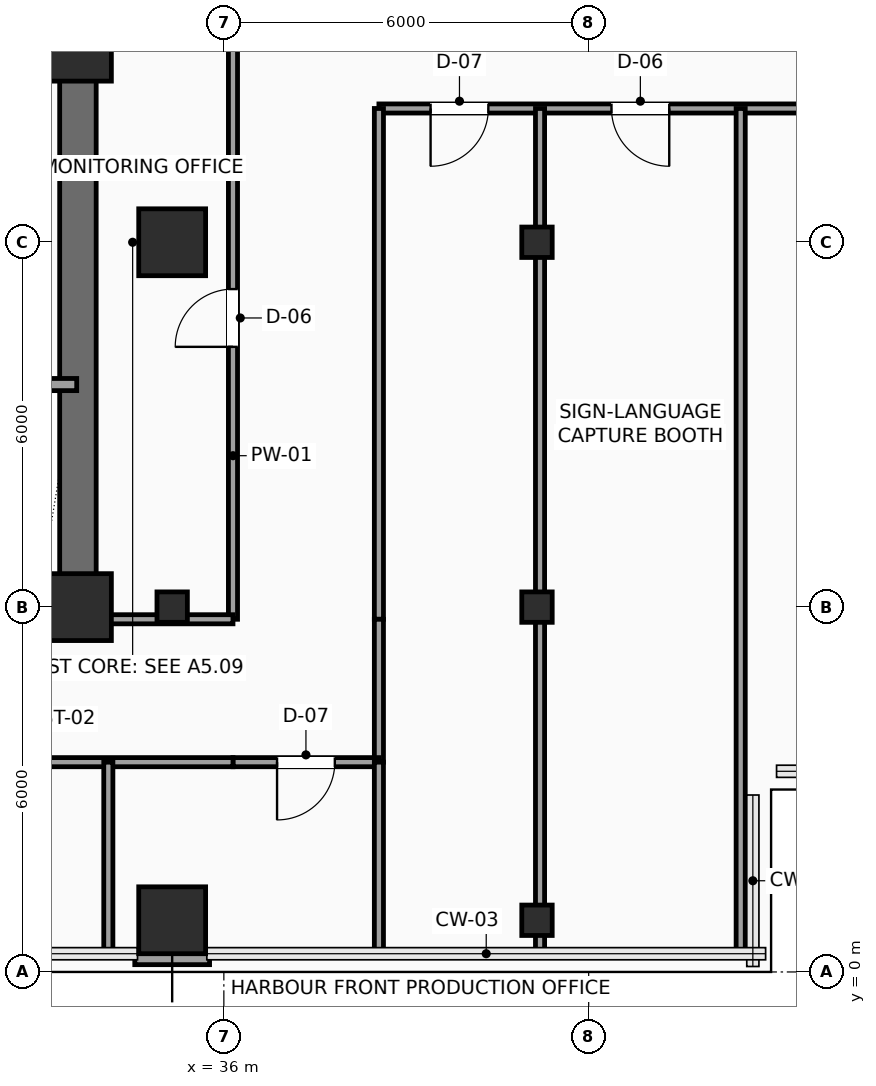
"""IFC4 building model, lengths in metres.
Left out: names, types, materials, properties, quantities, classifications, styles, units other than length and angle.
Written with IfcOpenShell. Run it as: python <this file> out.ifc"""

import sys

from ifc_helpers import new_model, si_unit, direction, frame, frame_2d, origin, origin_2d, place, context, subcontext, project, spatial, rectangle, hollow_rectangle, extrude, element, fill, save


model = new_model("IFC4")
c1 = context("Model", 3, precision=1e-05, world=origin(), true_north=direction((0.0, 1.0)))
c2 = subcontext(c1, "Body", "Model", "MODEL_VIEW")
j1 = project(units=[si_unit("LENGTHUNIT", "METRE"), si_unit("PLANEANGLEUNIT", "RADIAN")], contexts=[c1])
p1 = place(None, origin())
s1 = spatial("IfcSite", under=j1, at=p1, CompositionType="ELEMENT")
p2 = place(p1, origin())
s2 = spatial("IfcBuilding", under=s1, at=p2, CompositionType="ELEMENT")
p3 = place(p2, frame((0.0, 0.0, 160.65)))
s3 = spatial("IfcBuildingStorey", under=s2, at=p3, CompositionType="ELEMENT", Elevation=160.65)
for number, where, z_axis, x_axis in (
    (1, (33.6, 6.0, 0.0), (0.0, 0.0, 1.0), (1.0, 0.0, 0.0)),
    (2, (33.6, 15.2, 0.0), (0.0, 0.0, 1.0), (1.0, 0.0, 0.0)),
    (3, (35.15, 0.85, 0.0), (0.0, 0.0, 1.0), (1.0, 0.0, 0.0)),
):
    element("IfcColumn", number, at=place(p3, frame(where, z_axis=z_axis, x_axis=x_axis)), inside=s3, PredefinedType="COLUMN", context=c2, shape_type="SweptSolid", body=[
        extrude(rectangle(XDim=1.1, YDim=1.1, at=origin_2d()), origin(), (0.0, 0.0, 1.0), 3.75),
    ])
p4 = place(p3, frame((35.15, 6.0, 0.0), z_axis=(0.0, 0.0, 1.0), x_axis=(1.0, 0.0, 0.0)))
e4 = element("IfcColumn", 4, at=p4, inside=s3, PredefinedType="COLUMN", context=c2, shape_type="SweptSolid", body=[
    extrude(hollow_rectangle(XDim=0.5, YDim=0.5, WallThickness=0.025, InnerFilletRadius=0.025, OuterFilletRadius=0.04, at=origin_2d()), origin(), (0.0, 0.0, 1.0), 3.75),
])
p5 = place(p3, frame((35.15, 12.0, 0.0), z_axis=(0.0, 0.0, 1.0), x_axis=(1.0, 0.0, 0.0)))
e5 = element("IfcColumn", 5, at=p5, inside=s3, PredefinedType="COLUMN", context=c2, shape_type="SweptSolid", body=[
    extrude(rectangle(XDim=1.1, YDim=1.1, at=origin_2d()), origin(), (0.0, 0.0, 1.0), 3.75),
])
for number, where, z_axis, x_axis in (
    (6, (41.15, 0.85, 0.0), (0.0, 0.0, 1.0), (1.0, 0.0, 0.0)),
    (7, (41.15, 6.0, 0.0), (0.0, 0.0, 1.0), (1.0, 0.0, 0.0)),
    (8, (41.15, 12.0, 0.0), (0.0, 0.0, 1.0), (1.0, 0.0, 0.0)),
):
    element("IfcColumn", number, at=place(p3, frame(where, z_axis=z_axis, x_axis=x_axis)), inside=s3, PredefinedType="COLUMN", context=c2, shape_type="SweptSolid", body=[
        extrude(hollow_rectangle(XDim=0.5, YDim=0.5, WallThickness=0.025, InnerFilletRadius=0.025, OuterFilletRadius=0.04, at=origin_2d()), origin(), (0.0, 0.0, 1.0), 3.75),
    ])
p6 = place(p3, frame((35.765, 0.24, 0.0), z_axis=(0.0, 0.0, 1.0), x_axis=(-1.0, 0.0, 0.0)))
e9 = element("IfcWall", 9, at=p6, inside=s3, PredefinedType="SOLIDWALL", context=c2, shape_type="SweptSolid", body=[
    extrude(rectangle(XDim=1.23, YDim=0.24, at=frame_2d((0.615, 0.0))), origin(), (0.0, 0.0, 1.0), 3.425),
])
p7 = place(p3, frame((24.0, 6.0, 0.0), z_axis=(0.0, 0.0, 1.0), x_axis=(1.0, 0.0, 0.0)))
e10 = element("IfcWall", 10, at=p7, inside=s3, PredefinedType="SHEAR", context=c2, shape_type="SweptSolid", body=[
    extrude(rectangle(XDim=9.6, YDim=0.6, at=frame_2d((4.8, 0.0))), origin(), (0.0, 0.0, 1.0), 3.425),
])
p8 = place(p3, frame((33.6, 6.0, 0.0), z_axis=(0.0, 0.0, 1.0), x_axis=(0.0, 1.0, 0.0)))
e11 = element("IfcWall", 11, at=p8, inside=s3, PredefinedType="SHEAR", context=c2, shape_type="SweptSolid", body=[
    extrude(rectangle(XDim=12.0, YDim=0.6, at=frame_2d((6.0, 0.0))), origin(), (0.0, 0.0, 1.0), 3.425),
])
p9 = place(p8, frame((10.2, 0.0, 0.0)))
e12 = element("IfcOpeningElement", 12, at=p9, cuts=e11, PredefinedType="OPENING", context=c2, shape_type="SweptSolid", body=[
    extrude(rectangle(XDim=0.9, YDim=2.15, at=frame_2d((0.45, 1.075))), frame((0.0, 0.31, 0.0), z_axis=(0.0, -1.0, 0.0), x_axis=(1.0, 0.0, 0.0)), (0.0, 0.0, 1.0), 0.62),
])
p10 = place(p3, frame((29.26, 15.18, 0.0), z_axis=(0.0, 0.0, 1.0), x_axis=(1.0, 0.0, 0.0)))
e13 = element("IfcWall", 13, at=p10, inside=s3, PredefinedType="SHEAR", context=c2, shape_type="SweptSolid", body=[
    extrude(rectangle(XDim=4.04, YDim=0.2, at=frame_2d((2.02, 0.0))), origin(), (0.0, 0.0, 1.0), 3.425),
])
p11 = place(p3, frame((32.94, 9.66, 0.0), z_axis=(0.0, 0.0, 1.0), x_axis=(1.0, 0.0, 0.0)))
e14 = element("IfcWall", 14, at=p11, inside=s3, PredefinedType="SOLIDWALL", context=c2, shape_type="SweptSolid", body=[
    extrude(rectangle(XDim=0.64, YDim=0.2, at=frame_2d((0.32, 0.0))), origin(), (0.0, 0.0, 1.0), 3.425),
])
p12 = place(p3, frame((36.15, 5.8, 0.0), z_axis=(0.0, 0.0, 1.0), x_axis=(0.0, 1.0, 0.0)))
e15 = element("IfcWall", 15, at=p12, inside=s3, PredefinedType="PARTITIONING", context=c2, shape_type="SweptSolid", body=[
    extrude(rectangle(XDim=10.08, YDim=0.15, at=frame_2d((5.04, 0.0))), origin(), (0.0, 0.0, 1.0), 3.425),
])
p13 = place(p12, frame((4.48, 0.0, 0.0)))
e16 = element("IfcOpeningElement", 16, at=p13, cuts=e15, PredefinedType="OPENING", context=c2, shape_type="SweptSolid", body=[
    extrude(rectangle(XDim=0.95, YDim=2.15, at=frame_2d((0.475, 1.075))), frame((0.0, 0.085, 0.0), z_axis=(0.0, -1.0, 0.0), x_axis=(1.0, 0.0, 0.0)), (0.0, 0.0, 1.0), 0.17),
])
p14 = place(p3, frame((47.7, 14.2, 0.0), z_axis=(0.0, 0.0, 1.0), x_axis=(-1.0, 0.0, 0.0)))
e17 = element("IfcWall", 17, at=p14, inside=s3, PredefinedType="PARTITIONING", context=c2, shape_type="SweptSolid", body=[
    extrude(rectangle(XDim=9.15, YDim=0.15, at=frame_2d((4.575, 0.0))), origin(), (0.0, 0.0, 1.0), 3.425),
])
p15 = place(p14, frame((7.35, 0.0, 0.0)))
e18 = element("IfcOpeningElement", 18, at=p15, cuts=e17, PredefinedType="OPENING", context=c2, shape_type="SweptSolid", body=[
    extrude(rectangle(XDim=0.95, YDim=2.15, at=frame_2d((0.475, 1.075))), frame((0.0, 0.085, 0.0), z_axis=(0.0, -1.0, 0.0), x_axis=(1.0, 0.0, 0.0)), (0.0, 0.0, 1.0), 0.17),
])
p16 = place(p14, frame((4.375, 0.0, 0.0)))
e19 = element("IfcOpeningElement", 19, at=p16, cuts=e17, PredefinedType="OPENING", context=c2, shape_type="SweptSolid", body=[
    extrude(rectangle(XDim=0.95, YDim=2.15, at=frame_2d((0.475, 1.075))), frame((0.0, 0.085, 0.0), z_axis=(0.0, -1.0, 0.0), x_axis=(1.0, 0.0, 0.0)), (0.0, 0.0, 1.0), 0.17),
])
p17 = place(p3, frame((38.55, 14.2, 0.0), z_axis=(0.0, 0.0, 1.0), x_axis=(0.0, -1.0, 0.0)))
e20 = element("IfcWall", 20, at=p17, inside=s3, PredefinedType="PARTITIONING", context=c2, shape_type="SweptSolid", body=[
    extrude(rectangle(XDim=8.4, YDim=0.15, at=frame_2d((4.2, 0.0))), origin(), (0.0, 0.0, 1.0), 3.425),
])
p18 = place(p3, frame((38.55, 5.8, 0.0), z_axis=(0.0, 0.0, 1.0), x_axis=(0.0, -1.0, 0.0)))
e21 = element("IfcWall", 21, at=p18, inside=s3, PredefinedType="PARTITIONING", context=c2, shape_type="SweptSolid", body=[
    extrude(rectangle(XDim=2.35, YDim=0.15, at=frame_2d((1.175, 0.0))), origin(), (0.0, 0.0, 1.0), 3.425),
])
p19 = place(p3, frame((38.55, 3.45, 0.0), z_axis=(0.0, 0.0, 1.0), x_axis=(-1.0, 0.0, 0.0)))
e22 = element("IfcWall", 22, at=p19, inside=s3, PredefinedType="PARTITIONING", context=c2, shape_type="SweptSolid", body=[
    extrude(rectangle(XDim=2.4, YDim=0.15, at=frame_2d((1.2, 0.0))), origin(), (0.0, 0.0, 1.0), 2.967),
])
p20 = place(p19, frame((0.725, 0.0, 0.0)))
e23 = element("IfcOpeningElement", 23, at=p20, cuts=e22, PredefinedType="OPENING", context=c2, shape_type="SweptSolid", body=[
    extrude(rectangle(XDim=0.95, YDim=2.15, at=frame_2d((0.475, 1.075))), frame((0.0, 0.085, 0.0), z_axis=(0.0, -1.0, 0.0), x_axis=(1.0, 0.0, 0.0)), (0.0, 0.0, 1.0), 0.17),
])
p21 = place(p3, frame((36.15, 3.45, 0.0), z_axis=(0.0, 0.0, 1.0), x_axis=(-1.0, 0.0, 0.0)))
e24 = element("IfcWall", 24, at=p21, inside=s3, PredefinedType="PARTITIONING", context=c2, shape_type="SweptSolid", body=[
    extrude(rectangle(XDim=12.2, YDim=0.15, at=frame_2d((6.1, 0.0))), origin(), (0.0, 0.0, 1.0), 2.967),
])
p22 = place(p21, frame((10.8, 0.0, 0.0)))
e25 = element("IfcOpeningElement", 25, at=p22, cuts=e24, PredefinedType="OPENING", context=c2, shape_type="SweptSolid", body=[
    extrude(rectangle(XDim=0.95, YDim=2.15, at=frame_2d((0.475, 1.075))), frame((0.0, 0.085, 0.0), z_axis=(0.0, -1.0, 0.0), x_axis=(1.0, 0.0, 0.0)), (0.0, 0.0, 1.0), 0.17),
])
p23 = place(p21, frame((7.825, 0.0, 0.0)))
e26 = element("IfcOpeningElement", 26, at=p23, cuts=e24, PredefinedType="OPENING", context=c2, shape_type="SweptSolid", body=[
    extrude(rectangle(XDim=0.95, YDim=2.15, at=frame_2d((0.475, 1.075))), frame((0.0, 0.085, 0.0), z_axis=(0.0, -1.0, 0.0), x_axis=(1.0, 0.0, 0.0)), (0.0, 0.0, 1.0), 0.17),
])
p24 = place(p21, frame((3.675, 0.0, 0.0)))
e27 = element("IfcOpeningElement", 27, at=p24, cuts=e24, PredefinedType="OPENING", context=c2, shape_type="SweptSolid", body=[
    extrude(rectangle(XDim=0.95, YDim=2.15, at=frame_2d((0.475, 1.075))), frame((0.0, 0.085, 0.0), z_axis=(0.0, -1.0, 0.0), x_axis=(1.0, 0.0, 0.0)), (0.0, 0.0, 1.0), 0.17),
])
for number, where, z_axis, x_axis in (
    (28, (34.1, 0.3, 0.0), (0.0, 0.0, 1.0), (0.0, 1.0, 0.0)),
    (29, (38.55, 0.3, 0.0), (0.0, 0.0, 1.0), (0.0, 1.0, 0.0)),
):
    element("IfcWall", number, at=place(p3, frame(where, z_axis=z_axis, x_axis=x_axis)), inside=s3, PredefinedType="PARTITIONING", context=c2, shape_type="SweptSolid", body=[
        extrude(rectangle(XDim=3.15, YDim=0.15, at=frame_2d((1.575, 0.0))), origin(), (0.0, 0.0, 1.0), 3.425),
    ])
p25 = place(p3, frame((33.65, 5.8, 0.0), z_axis=(0.0, 0.0, 1.0), x_axis=(1.0, 0.0, 0.0)))
e30 = element("IfcWall", 30, at=p25, inside=s3, PredefinedType="PARTITIONING", context=c2, shape_type="SweptSolid", body=[
    extrude(rectangle(XDim=2.5, YDim=0.15, at=frame_2d((1.25, 0.0))), origin(), (0.0, 0.0, 1.0), 2.917),
])
p26 = place(p3, frame((41.2, 0.3, 0.0), z_axis=(0.0, 0.0, 1.0), x_axis=(0.0, 1.0, 0.0)))
e31 = element("IfcWall", 31, at=p26, inside=s3, PredefinedType="PARTITIONING", context=c2, shape_type="SweptSolid", body=[
    extrude(rectangle(XDim=13.9, YDim=0.15, at=frame_2d((6.95, 0.0))), origin(), (0.0, 0.0, 1.0), 2.917),
])
p27 = place(p3, frame((44.5, 0.3, 0.0), z_axis=(0.0, 0.0, 1.0), x_axis=(0.0, 1.0, 0.0)))
e32 = element("IfcWall", 32, at=p27, inside=s3, PredefinedType="PARTITIONING", context=c2, shape_type="SweptSolid", body=[
    extrude(rectangle(XDim=13.9, YDim=0.15, at=frame_2d((6.95, 0.0))), origin(), (0.0, 0.0, 1.0), 3.425),
])
p28 = place(p13, origin())
e33 = element("IfcDoor", 33, at=p28, inside=s3, OperationType="SINGLE_SWING_LEFT", PredefinedType="DOOR", context=c2, shape_type="SweptSolid", body=[
    extrude(rectangle(XDim=0.95, YDim=2.15, at=frame_2d((0.475, 1.075))), frame((0.0, 0.025, 0.0), z_axis=(0.0, -1.0, 0.0), x_axis=(1.0, 0.0, 0.0)), (0.0, 0.0, 1.0), 0.05),
])
fill(e16, e33)
p29 = place(p15, origin())
e34 = element("IfcDoor", 34, at=p29, inside=s3, OperationType="SINGLE_SWING_RIGHT", PredefinedType="DOOR", context=c2, shape_type="SweptSolid", body=[
    extrude(rectangle(XDim=0.95, YDim=2.15, at=frame_2d((0.475, 1.075))), frame((0.0, 0.025, 0.0), z_axis=(0.0, -1.0, 0.0), x_axis=(1.0, 0.0, 0.0)), (0.0, 0.0, 1.0), 0.05),
])
fill(e18, e34)
p30 = place(p16, origin())
e35 = element("IfcDoor", 35, at=p30, inside=s3, OperationType="SINGLE_SWING_LEFT", PredefinedType="DOOR", context=c2, shape_type="SweptSolid", body=[
    extrude(rectangle(XDim=0.95, YDim=2.15, at=frame_2d((0.475, 1.075))), frame((0.0, 0.025, 0.0), z_axis=(0.0, -1.0, 0.0), x_axis=(1.0, 0.0, 0.0)), (0.0, 0.0, 1.0), 0.05),
])
fill(e19, e35)
p31 = place(p20, origin())
e36 = element("IfcDoor", 36, at=p31, inside=s3, OperationType="SINGLE_SWING_RIGHT", PredefinedType="DOOR", context=c2, shape_type="SweptSolid", body=[
    extrude(rectangle(XDim=0.95, YDim=2.15, at=frame_2d((0.475, 1.075))), frame((0.0, 0.025, 0.0), z_axis=(0.0, -1.0, 0.0), x_axis=(1.0, 0.0, 0.0)), (0.0, 0.0, 1.0), 0.05),
])
fill(e23, e36)
save(model, sys.argv[1])
